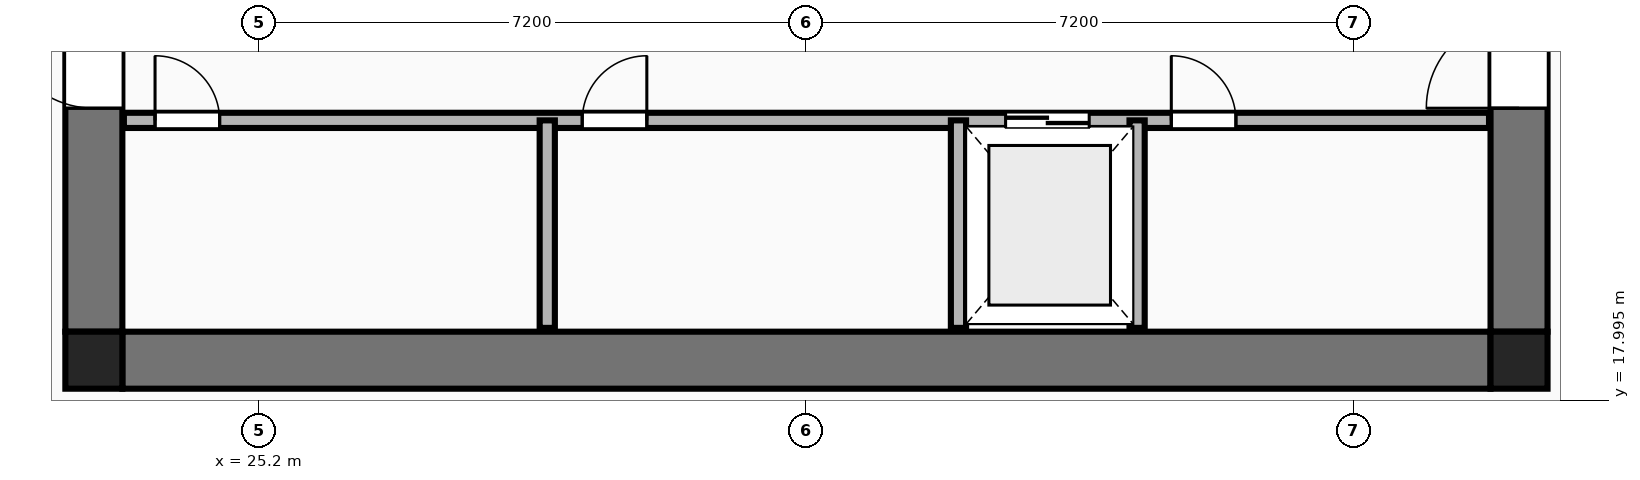
"""IFC4 building model, lengths in metres.
Left out: names, types, materials, properties, quantities, classifications, styles, units other than length and angle.
Written with IfcOpenShell. Run it as: python <this file> out.ifc"""

import sys

from ifc_helpers import new_model, si_unit, direction, frame, frame_2d, origin, origin_2d, place, context, subcontext, project, spatial, rectangle, extrude, element, fill, save


model = new_model("IFC4")
c1 = context("Model", 3, precision=1e-05, world=origin(), true_north=direction((0.0, 1.0)))
c2 = subcontext(c1, "Body", "Model", "MODEL_VIEW")
j1 = project(units=[si_unit("LENGTHUNIT", "METRE"), si_unit("PLANEANGLEUNIT", "RADIAN")], contexts=[c1])
p1 = place(None, origin())
s1 = spatial("IfcSite", under=j1, at=p1, CompositionType="ELEMENT")
p2 = place(p1, origin())
s2 = spatial("IfcBuilding", under=s1, at=p2, CompositionType="ELEMENT")
p3 = place(p2, frame((0.0, 0.0, 137.45)))
s3 = spatial("IfcBuildingStorey", under=s2, at=p3, CompositionType="ELEMENT", Elevation=137.45)
for number, where, z_axis, x_axis in (
    (1, (23.025, 18.525, 0.0), (0.0, 0.0, 1.0), (1.0, 0.0, 0.0)),
    (2, (41.775, 18.525, 0.0), (0.0, 0.0, 1.0), (1.0, 0.0, 0.0)),
):
    element("IfcColumn", number, at=place(p3, frame(where, z_axis=z_axis, x_axis=x_axis)), inside=s3, PredefinedType="COLUMN", context=c2, shape_type="SweptSolid", body=[
        extrude(rectangle(XDim=0.75, YDim=0.75, at=origin_2d()), origin(), (0.0, 0.0, 1.0), 3.55),
    ])
p4 = place(p3, frame((23.4, 18.525, 0.0), z_axis=(0.0, 0.0, 1.0), x_axis=(1.0, 0.0, 0.0)))
e3 = element("IfcWall", 3, at=p4, inside=s3, PredefinedType="SHEAR", context=c2, shape_type="SweptSolid", body=[
    extrude(rectangle(XDim=18.0, YDim=0.75, at=frame_2d((9.0, 0.0))), origin(), (0.0, 0.0, 1.0), 3.34),
])
p5 = place(p3, frame((23.025, 18.9, 0.0), z_axis=(0.0, 0.0, 1.0), x_axis=(0.0, 1.0, 0.0)))
e4 = element("IfcWall", 4, at=p5, inside=s3, PredefinedType="SHEAR", context=c2, shape_type="SweptSolid", body=[
    extrude(rectangle(XDim=14.0, YDim=0.75, at=frame_2d((7.0, 0.0))), origin(), (0.0, 0.0, 1.0), 3.34),
])
p6 = place(p5, frame((2.94, 0.0, 0.0)))
e5 = element("IfcOpeningElement", 5, at=p6, cuts=e4, PredefinedType="OPENING", context=c2, shape_type="SweptSolid", body=[
    extrude(rectangle(XDim=1.22, YDim=2.25, at=frame_2d((0.61, 1.125))), frame((0.0, 0.385, 0.0), z_axis=(0.0, -1.0, 0.0), x_axis=(1.0, 0.0, 0.0)), (0.0, 0.0, 1.0), 0.77),
])
p7 = place(p3, frame((41.775, 18.9, 0.0), z_axis=(0.0, 0.0, 1.0), x_axis=(0.0, 1.0, 0.0)))
e6 = element("IfcWall", 6, at=p7, inside=s3, PredefinedType="SHEAR", context=c2, shape_type="SweptSolid", body=[
    extrude(rectangle(XDim=14.0, YDim=0.75, at=frame_2d((7.0, 0.0))), origin(), (0.0, 0.0, 1.0), 3.34),
])
p8 = place(p7, frame((2.94, 0.0, 0.0)))
e7 = element("IfcOpeningElement", 7, at=p8, cuts=e6, PredefinedType="OPENING", context=c2, shape_type="SweptSolid", body=[
    extrude(rectangle(XDim=1.22, YDim=2.25, at=frame_2d((0.61, 1.125))), frame((0.0, 0.385, 0.0), z_axis=(0.0, -1.0, 0.0), x_axis=(1.0, 0.0, 0.0)), (0.0, 0.0, 1.0), 0.77),
])
p9 = place(p3, frame((23.42, 21.68, 0.0), z_axis=(0.0, 0.0, 1.0), x_axis=(1.0, 0.0, 0.0)))
e8 = element("IfcWall", 8, at=p9, inside=s3, PredefinedType="PLUMBINGWALL", context=c2, shape_type="SweptSolid", body=[
    extrude(rectangle(XDim=17.96, YDim=0.2, at=frame_2d((8.98, 0.0))), origin(), (0.0, 0.0, 1.0), 3.34),
])
p10 = place(p9, frame((11.6, 0.0, 0.0)))
e9 = element("IfcOpeningElement", 9, at=p10, cuts=e8, PredefinedType="OPENING", context=c2, shape_type="SweptSolid", body=[
    extrude(rectangle(XDim=1.1, YDim=2.2, at=frame_2d((0.55, 1.1))), frame((0.0, 0.11, 0.0), z_axis=(0.0, -1.0, 0.0), x_axis=(1.0, 0.0, 0.0)), (0.0, 0.0, 1.0), 0.22),
])
p11 = place(p9, frame((0.41, 0.0, 0.0)))
e10 = element("IfcOpeningElement", 10, at=p11, cuts=e8, PredefinedType="OPENING", context=c2, shape_type="SweptSolid", body=[
    extrude(rectangle(XDim=0.85, YDim=2.05, at=frame_2d((0.425, 1.025))), frame((0.0, 0.11, 0.0), z_axis=(0.0, -1.0, 0.0), x_axis=(1.0, 0.0, 0.0)), (0.0, 0.0, 1.0), 0.22),
])
p12 = place(p9, frame((6.03, 0.0, 0.0)))
e11 = element("IfcOpeningElement", 11, at=p12, cuts=e8, PredefinedType="OPENING", context=c2, shape_type="SweptSolid", body=[
    extrude(rectangle(XDim=0.85, YDim=2.05, at=frame_2d((0.425, 1.025))), frame((0.0, 0.11, 0.0), z_axis=(0.0, -1.0, 0.0), x_axis=(1.0, 0.0, 0.0)), (0.0, 0.0, 1.0), 0.22),
])
p13 = place(p9, frame((13.78, 0.0, 0.0)))
e12 = element("IfcOpeningElement", 12, at=p13, cuts=e8, PredefinedType="OPENING", context=c2, shape_type="SweptSolid", body=[
    extrude(rectangle(XDim=0.85, YDim=2.05, at=frame_2d((0.425, 1.025))), frame((0.0, 0.11, 0.0), z_axis=(0.0, -1.0, 0.0), x_axis=(1.0, 0.0, 0.0)), (0.0, 0.0, 1.0), 0.22),
])
for number, where, z_axis, x_axis in (
    (13, (34.4, 18.95, 0.0), (0.0, 0.0, 1.0), (0.0, 1.0, 0.0)),
    (14, (36.75, 18.95, 0.0), (0.0, 0.0, 1.0), (0.0, 1.0, 0.0)),
    (15, (28.99, 18.95, 0.0), (0.0, 0.0, 1.0), (0.0, 1.0, 0.0)),
):
    element("IfcWall", number, at=place(p3, frame(where, z_axis=z_axis, x_axis=x_axis)), inside=s3, PredefinedType="PLUMBINGWALL", context=c2, shape_type="SweptSolid", body=[
        extrude(rectangle(XDim=2.73, YDim=0.2, at=frame_2d((1.365, 0.0))), origin(), (0.0, 0.0, 1.0), 3.34),
    ])
p14 = place(p6, origin())
e16 = element("IfcDoor", 16, at=p14, inside=s3, OperationType="SINGLE_SWING_RIGHT", PredefinedType="DOOR", context=c2, shape_type="SweptSolid", body=[
    extrude(rectangle(XDim=1.22, YDim=2.25, at=frame_2d((0.61, 1.125))), frame((0.0, 0.025, 0.0), z_axis=(0.0, -1.0, 0.0), x_axis=(1.0, 0.0, 0.0)), (0.0, 0.0, 1.0), 0.05),
])
fill(e5, e16)
p15 = place(p8, origin())
e17 = element("IfcDoor", 17, at=p15, inside=s3, OperationType="SINGLE_SWING_LEFT", PredefinedType="DOOR", context=c2, shape_type="SweptSolid", body=[
    extrude(rectangle(XDim=1.22, YDim=2.25, at=frame_2d((0.61, 1.125))), frame((0.0, 0.025, 0.0), z_axis=(0.0, -1.0, 0.0), x_axis=(1.0, 0.0, 0.0)), (0.0, 0.0, 1.0), 0.05),
])
fill(e7, e17)
p16 = place(p10, origin())
e18 = element("IfcDoor", 18, at=p16, inside=s3, OperationType="DOUBLE_DOOR_SLIDING", PredefinedType="DOOR", context=c2, shape_type="SweptSolid", body=[
    extrude(rectangle(XDim=1.1, YDim=2.2, at=frame_2d((0.55, 1.1))), frame((0.0, 0.025, 0.0), z_axis=(0.0, -1.0, 0.0), x_axis=(1.0, 0.0, 0.0)), (0.0, 0.0, 1.0), 0.05),
])
fill(e9, e18)
p17 = place(p11, origin())
e19 = element("IfcDoor", 19, at=p17, inside=s3, OperationType="SINGLE_SWING_LEFT", PredefinedType="DOOR", context=c2, shape_type="SweptSolid", body=[
    extrude(rectangle(XDim=0.85, YDim=2.05, at=frame_2d((0.425, 1.025))), frame((0.0, 0.025, 0.0), z_axis=(0.0, -1.0, 0.0), x_axis=(1.0, 0.0, 0.0)), (0.0, 0.0, 1.0), 0.05),
])
fill(e10, e19)
p18 = place(p12, origin())
e20 = element("IfcDoor", 20, at=p18, inside=s3, OperationType="SINGLE_SWING_RIGHT", PredefinedType="DOOR", context=c2, shape_type="SweptSolid", body=[
    extrude(rectangle(XDim=0.85, YDim=2.05, at=frame_2d((0.425, 1.025))), frame((0.0, 0.025, 0.0), z_axis=(0.0, -1.0, 0.0), x_axis=(1.0, 0.0, 0.0)), (0.0, 0.0, 1.0), 0.05),
])
fill(e11, e20)
p19 = place(p13, origin())
e21 = element("IfcDoor", 21, at=p19, inside=s3, OperationType="SINGLE_SWING_LEFT", PredefinedType="DOOR", context=c2, shape_type="SweptSolid", body=[
    extrude(rectangle(XDim=0.85, YDim=2.05, at=frame_2d((0.425, 1.025))), frame((0.0, 0.025, 0.0), z_axis=(0.0, -1.0, 0.0), x_axis=(1.0, 0.0, 0.0)), (0.0, 0.0, 1.0), 0.05),
])
fill(e12, e21)
save(model, sys.argv[1])
